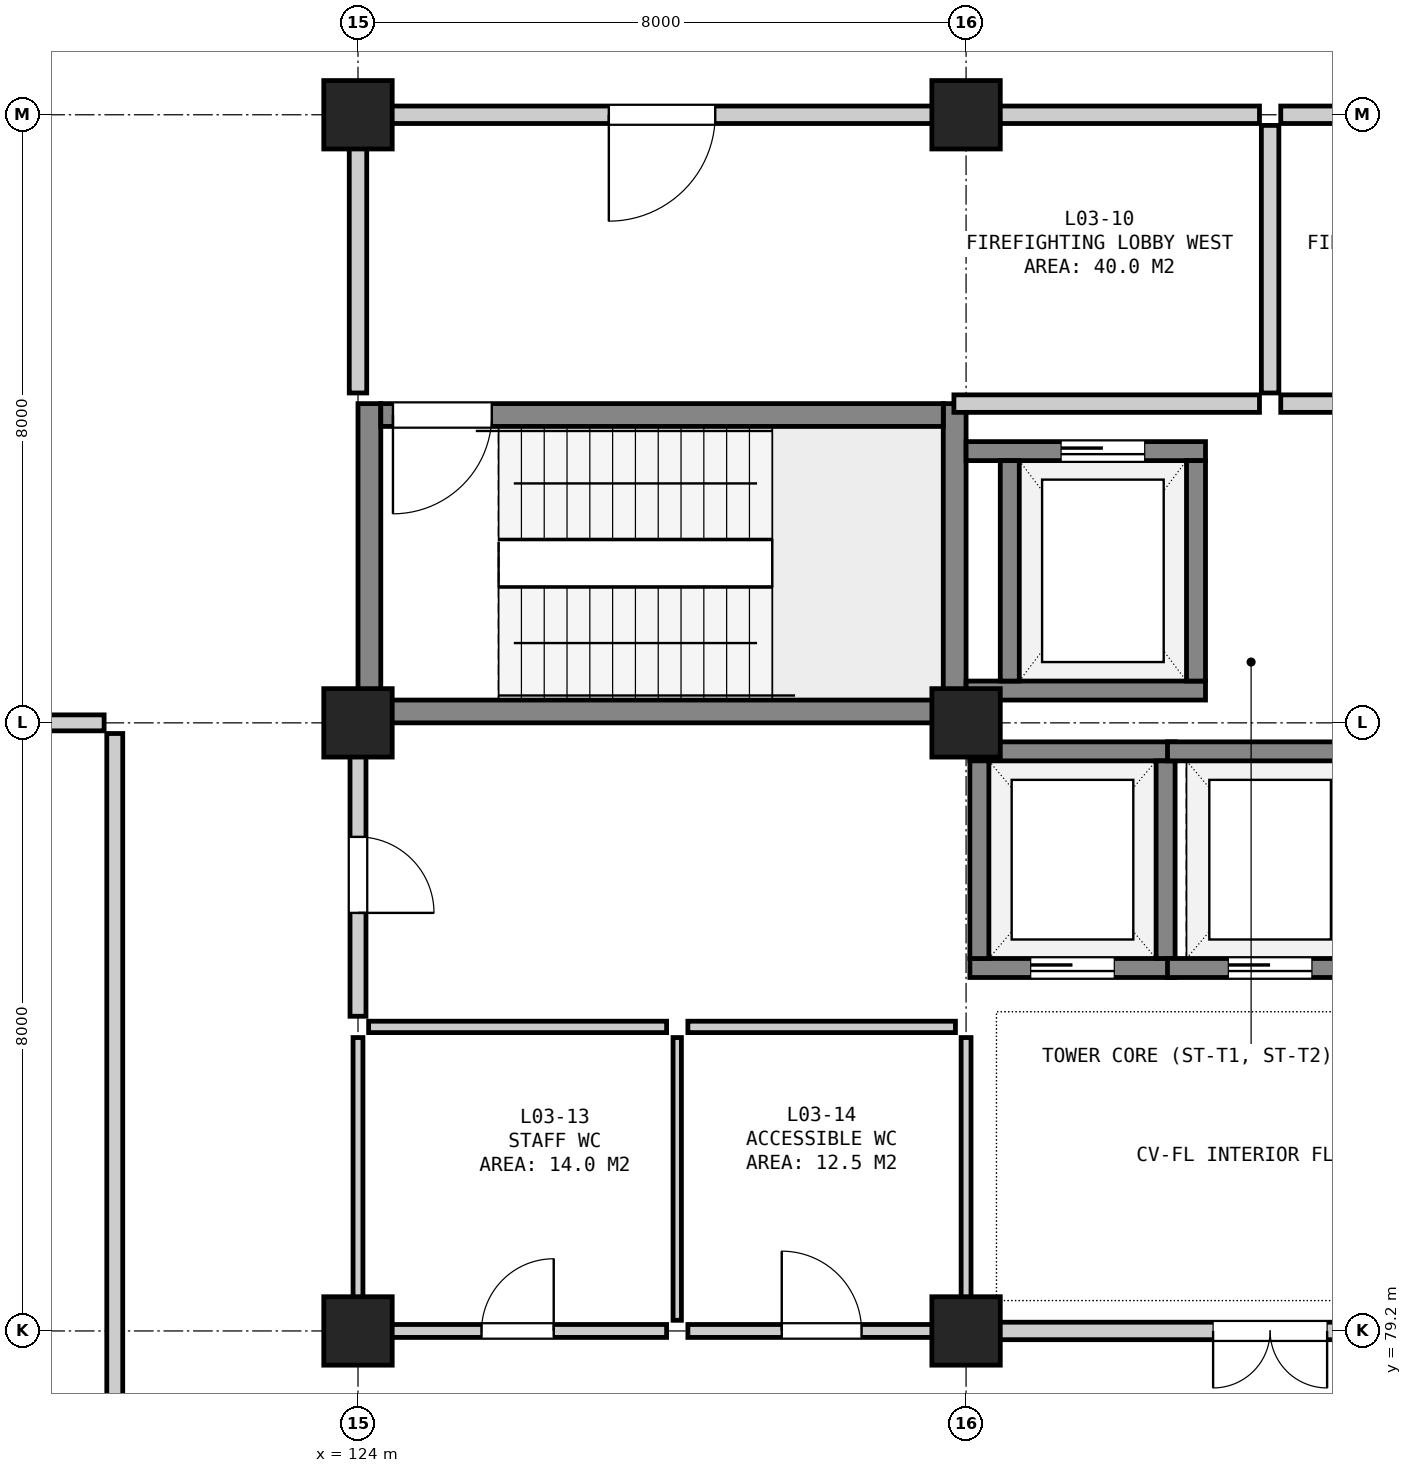
"""IFC4 building model, lengths in metres.
Left out: names, types, materials, properties, quantities, classifications, styles, units other than length and angle.
Written with IfcOpenShell. Run it as: python <this file> out.ifc"""

import sys

from ifc_helpers import new_model, si_unit, direction, frame, frame_2d, origin, origin_2d, place, context, subcontext, project, spatial, rectangle, extrude, element, fill, save


model = new_model("IFC4")
c1 = context("Model", 3, precision=1e-05, world=origin(), true_north=direction((0.0, 1.0)))
c2 = subcontext(c1, "Body", "Model", "MODEL_VIEW")
j1 = project(units=[si_unit("LENGTHUNIT", "METRE"), si_unit("PLANEANGLEUNIT", "RADIAN")], contexts=[c1])
p1 = place(None, origin())
s1 = spatial("IfcSite", under=j1, at=p1, CompositionType="ELEMENT")
p2 = place(p1, origin())
s2 = spatial("IfcBuilding", under=s1, at=p2, CompositionType="ELEMENT")
p3 = place(p2, frame((0.0, 0.0, 15.6)))
s3 = spatial("IfcBuildingStorey", under=s2, at=p3, CompositionType="ELEMENT", Elevation=15.6)
for number, where, z_axis, x_axis in (
    (1, (124.0, 79.2, 0.0), (0.0, 0.0, 1.0), (1.0, 0.0, 0.0)),
    (2, (124.0, 87.2, 0.0), (0.0, 0.0, 1.0), (1.0, 0.0, 0.0)),
    (3, (124.0, 95.2, 0.0), (0.0, 0.0, 1.0), (1.0, 0.0, 0.0)),
    (4, (132.0, 79.2, 0.0), (0.0, 0.0, 1.0), (1.0, 0.0, 0.0)),
    (5, (132.0, 87.2, 0.0), (0.0, 0.0, 1.0), (1.0, 0.0, 0.0)),
    (6, (132.0, 95.2, 0.0), (0.0, 0.0, 1.0), (1.0, 0.0, 0.0)),
):
    element("IfcColumn", number, at=place(p3, frame(where, z_axis=z_axis, x_axis=x_axis)), inside=s3, PredefinedType="COLUMN", context=c2, shape_type="SweptSolid", body=[
        extrude(rectangle(XDim=0.9, YDim=0.9, at=origin_2d()), origin(), (0.0, 0.0, 1.0), 4.2),
    ])
for number, where, z_axis, x_axis in (
    (7, (124.15, 87.2, 0.0), (0.0, 0.0, 1.0), (0.0, 1.0, 0.0)),
    (8, (131.85, 87.2, 0.0), (0.0, 0.0, 1.0), (0.0, 1.0, 0.0)),
):
    element("IfcWall", number, at=place(p3, frame(where, z_axis=z_axis, x_axis=x_axis)), inside=s3, PredefinedType="SHEAR", context=c2, shape_type="SweptSolid", body=[
        extrude(rectangle(XDim=4.2, YDim=0.3, at=frame_2d((2.1, 0.0))), origin(), (0.0, 0.0, 1.0), 3.9),
    ])
p4 = place(p3, frame((124.3, 87.35, 0.0), z_axis=(0.0, 0.0, 1.0), x_axis=(1.0, 0.0, 0.0)))
e9 = element("IfcWall", 9, at=p4, inside=s3, PredefinedType="SHEAR", context=c2, shape_type="SweptSolid", body=[
    extrude(rectangle(XDim=7.4, YDim=0.3, at=frame_2d((3.7, 0.0))), origin(), (0.0, 0.0, 1.0), 3.9),
])
p5 = place(p3, frame((124.3, 91.25, 0.0), z_axis=(0.0, 0.0, 1.0), x_axis=(1.0, 0.0, 0.0)))
e10 = element("IfcWall", 10, at=p5, inside=s3, PredefinedType="SHEAR", context=c2, shape_type="SweptSolid", body=[
    extrude(rectangle(XDim=7.4, YDim=0.3, at=frame_2d((3.7, 0.0))), origin(), (0.0, 0.0, 1.0), 3.9),
])
p6 = place(p5, frame((0.16, 0.0, 0.0)))
e11 = element("IfcOpeningElement", 11, at=p6, cuts=e10, PredefinedType="OPENING", context=c2, shape_type="SweptSolid", body=[
    extrude(rectangle(XDim=1.3, YDim=2.18, at=frame_2d((0.65, 1.09))), frame((0.0, 0.162, 0.0), z_axis=(0.0, -1.0, 0.0), x_axis=(1.0, 0.0, 0.0)), (0.0, 0.0, 1.0), 0.324),
])
p7 = place(p3, frame((132.0, 87.625, 0.0), z_axis=(0.0, 0.0, 1.0), x_axis=(1.0, 0.0, 0.0)))
e12 = element("IfcWall", 12, at=p7, inside=s3, PredefinedType="SHEAR", context=c2, shape_type="SweptSolid", body=[
    extrude(rectangle(XDim=3.15, YDim=0.25, at=frame_2d((1.575, 0.0))), origin(), (0.0, 0.0, 1.0), 3.9),
])
p8 = place(p3, frame((132.0, 90.775, 0.0), z_axis=(0.0, 0.0, 1.0), x_axis=(1.0, 0.0, 0.0)))
e13 = element("IfcWall", 13, at=p8, inside=s3, PredefinedType="SHEAR", context=c2, shape_type="SweptSolid", body=[
    extrude(rectangle(XDim=3.15, YDim=0.25, at=frame_2d((1.575, 0.0))), origin(), (0.0, 0.0, 1.0), 3.9),
])
p9 = place(p8, frame((1.25, 0.0, 0.0)))
e14 = element("IfcOpeningElement", 14, at=p9, cuts=e13, PredefinedType="OPENING", context=c2, shape_type="SweptSolid", body=[
    extrude(rectangle(XDim=1.1, YDim=2.15, at=frame_2d((0.55, 1.075))), frame((0.0, 0.137, 0.0), z_axis=(0.0, -1.0, 0.0), x_axis=(1.0, 0.0, 0.0)), (0.0, 0.0, 1.0), 0.274),
])
for number, where, z_axis, x_axis in (
    (15, (132.575, 87.75, 0.0), (0.0, 0.0, 1.0), (0.0, 1.0, 0.0)),
    (16, (135.025, 87.75, 0.0), (0.0, 0.0, 1.0), (0.0, 1.0, 0.0)),
):
    element("IfcWall", number, at=place(p3, frame(where, z_axis=z_axis, x_axis=x_axis)), inside=s3, PredefinedType="SHEAR", context=c2, shape_type="SweptSolid", body=[
        extrude(rectangle(XDim=2.9, YDim=0.25, at=frame_2d((1.45, 0.0))), origin(), (0.0, 0.0, 1.0), 3.9),
    ])
p10 = place(p3, frame((132.05, 83.975, 0.0), z_axis=(0.0, 0.0, 1.0), x_axis=(1.0, 0.0, 0.0)))
e17 = element("IfcWall", 17, at=p10, inside=s3, PredefinedType="SHEAR", context=c2, shape_type="SweptSolid", body=[
    extrude(rectangle(XDim=2.7, YDim=0.25, at=frame_2d((1.35, 0.0))), origin(), (0.0, 0.0, 1.0), 3.9),
])
p11 = place(p10, frame((0.8, 0.0, 0.0)))
e18 = element("IfcOpeningElement", 18, at=p11, cuts=e17, PredefinedType="OPENING", context=c2, shape_type="SweptSolid", body=[
    extrude(rectangle(XDim=1.1, YDim=2.15, at=frame_2d((0.55, 1.075))), frame((0.0, 0.137, 0.0), z_axis=(0.0, -1.0, 0.0), x_axis=(1.0, 0.0, 0.0)), (0.0, 0.0, 1.0), 0.274),
])
p12 = place(p3, frame((132.05, 86.825, 0.0), z_axis=(0.0, 0.0, 1.0), x_axis=(1.0, 0.0, 0.0)))
e19 = element("IfcWall", 19, at=p12, inside=s3, PredefinedType="SHEAR", context=c2, shape_type="SweptSolid", body=[
    extrude(rectangle(XDim=2.7, YDim=0.25, at=frame_2d((1.35, 0.0))), origin(), (0.0, 0.0, 1.0), 3.9),
])
for number, where, z_axis, x_axis in (
    (20, (132.175, 84.1, 0.0), (0.0, 0.0, 1.0), (0.0, 1.0, 0.0)),
    (21, (134.625, 84.1, 0.0), (0.0, 0.0, 1.0), (0.0, 1.0, 0.0)),
):
    element("IfcWall", number, at=place(p3, frame(where, z_axis=z_axis, x_axis=x_axis)), inside=s3, PredefinedType="SHEAR", context=c2, shape_type="SweptSolid", body=[
        extrude(rectangle(XDim=2.6, YDim=0.25, at=frame_2d((1.3, 0.0))), origin(), (0.0, 0.0, 1.0), 3.9),
    ])
p13 = place(p3, frame((134.65, 83.975, 0.0), z_axis=(0.0, 0.0, 1.0), x_axis=(1.0, 0.0, 0.0)))
e22 = element("IfcWall", 22, at=p13, inside=s3, PredefinedType="SHEAR", context=c2, shape_type="SweptSolid", body=[
    extrude(rectangle(XDim=2.7, YDim=0.25, at=frame_2d((1.35, 0.0))), origin(), (0.0, 0.0, 1.0), 3.9),
])
p14 = place(p13, frame((0.8, 0.0, 0.0)))
e23 = element("IfcOpeningElement", 23, at=p14, cuts=e22, PredefinedType="OPENING", context=c2, shape_type="SweptSolid", body=[
    extrude(rectangle(XDim=1.1, YDim=2.15, at=frame_2d((0.55, 1.075))), frame((0.0, 0.137, 0.0), z_axis=(0.0, -1.0, 0.0), x_axis=(1.0, 0.0, 0.0)), (0.0, 0.0, 1.0), 0.274),
])
p15 = place(p3, frame((134.65, 86.825, 0.0), z_axis=(0.0, 0.0, 1.0), x_axis=(1.0, 0.0, 0.0)))
e24 = element("IfcWall", 24, at=p15, inside=s3, PredefinedType="SHEAR", context=c2, shape_type="SweptSolid", body=[
    extrude(rectangle(XDim=2.7, YDim=0.25, at=frame_2d((1.35, 0.0))), origin(), (0.0, 0.0, 1.0), 3.9),
])
p16 = place(p3, frame((131.84, 91.4, 0.0), z_axis=(0.0, 0.0, 1.0), x_axis=(1.0, 0.0, 0.0)))
e25 = element("IfcWall", 25, at=p16, inside=s3, PredefinedType="SOLIDWALL", context=c2, shape_type="SweptSolid", body=[
    extrude(rectangle(XDim=4.02, YDim=0.23, at=frame_2d((2.01, 0.0))), origin(), (0.0, 0.0, 1.0), 3.9),
])
p17 = place(p3, frame((124.14, 95.2, 0.0), z_axis=(0.0, 0.0, 1.0), x_axis=(1.0, 0.0, 0.0)))
e26 = element("IfcWall", 26, at=p17, inside=s3, PredefinedType="SOLIDWALL", context=c2, shape_type="SweptSolid", body=[
    extrude(rectangle(XDim=11.72, YDim=0.23, at=frame_2d((5.86, 0.0))), origin(), (0.0, 0.0, 1.0), 3.195),
])
p18 = place(p17, frame((3.16, 0.0, 0.0)))
e27 = element("IfcOpeningElement", 27, at=p18, cuts=e26, PredefinedType="OPENING", context=c2, shape_type="SweptSolid", body=[
    extrude(rectangle(XDim=1.4, YDim=2.2, at=frame_2d((0.7, 1.1))), frame((0.0, 0.127, 0.0), z_axis=(0.0, -1.0, 0.0), x_axis=(1.0, 0.0, 0.0)), (0.0, 0.0, 1.0), 0.254),
])
p19 = place(p3, frame((124.0, 91.54, 0.0), z_axis=(0.0, 0.0, 1.0), x_axis=(0.0, 1.0, 0.0)))
e28 = element("IfcWall", 28, at=p19, inside=s3, PredefinedType="SOLIDWALL", context=c2, shape_type="SweptSolid", body=[
    extrude(rectangle(XDim=3.52, YDim=0.23, at=frame_2d((1.76, 0.0))), origin(), (0.0, 0.0, 1.0), 3.145),
])
p20 = place(p3, frame((136.0, 91.54, 0.0), z_axis=(0.0, 0.0, 1.0), x_axis=(0.0, 1.0, 0.0)))
e29 = element("IfcWall", 29, at=p20, inside=s3, PredefinedType="SOLIDWALL", context=c2, shape_type="SweptSolid", body=[
    extrude(rectangle(XDim=3.52, YDim=0.23, at=frame_2d((1.76, 0.0))), origin(), (0.0, 0.0, 1.0), 3.9),
])
p21 = place(p3, frame((136.14, 91.4, 0.0), z_axis=(0.0, 0.0, 1.0), x_axis=(1.0, 0.0, 0.0)))
e30 = element("IfcWall", 30, at=p21, inside=s3, PredefinedType="SOLIDWALL", context=c2, shape_type="SweptSolid", body=[
    extrude(rectangle(XDim=4.02, YDim=0.23, at=frame_2d((2.01, 0.0))), origin(), (0.0, 0.0, 1.0), 3.9),
])
p22 = place(p3, frame((136.14, 95.2, 0.0), z_axis=(0.0, 0.0, 1.0), x_axis=(1.0, 0.0, 0.0)))
e31 = element("IfcWall", 31, at=p22, inside=s3, PredefinedType="SOLIDWALL", context=c2, shape_type="SweptSolid", body=[
    extrude(rectangle(XDim=11.72, YDim=0.23, at=frame_2d((5.86, 0.0))), origin(), (0.0, 0.0, 1.0), 3.245),
])
p23 = place(p22, frame((7.16, 0.0, 0.0)))
e32 = element("IfcOpeningElement", 32, at=p23, cuts=e31, PredefinedType="OPENING", context=c2, shape_type="SweptSolid", body=[
    extrude(rectangle(XDim=1.4, YDim=2.2, at=frame_2d((0.7, 1.1))), frame((0.0, 0.127, 0.0), z_axis=(0.0, -1.0, 0.0), x_axis=(1.0, 0.0, 0.0)), (0.0, 0.0, 1.0), 0.254),
])
p24 = place(p3, frame((124.14, 79.2, 0.0), z_axis=(0.0, 0.0, 1.0), x_axis=(1.0, 0.0, 0.0)))
e33 = element("IfcWall", 33, at=p24, inside=s3, PredefinedType="PARTITIONING", context=c2, shape_type="SweptSolid", body=[
    extrude(rectangle(XDim=3.92, YDim=0.17, at=frame_2d((1.96, 0.0))), origin(), (0.0, 0.0, 1.0), 3.295),
])
p25 = place(p24, frame((1.485, 0.0, 0.0)))
e34 = element("IfcOpeningElement", 34, at=p25, cuts=e33, PredefinedType="OPENING", context=c2, shape_type="SweptSolid", body=[
    extrude(rectangle(XDim=0.95, YDim=2.15, at=frame_2d((0.475, 1.075))), frame((0.0, 0.097, 0.0), z_axis=(0.0, -1.0, 0.0), x_axis=(1.0, 0.0, 0.0)), (0.0, 0.0, 1.0), 0.194),
])
p26 = place(p3, frame((124.14, 83.2, 0.0), z_axis=(0.0, 0.0, 1.0), x_axis=(1.0, 0.0, 0.0)))
e35 = element("IfcWall", 35, at=p26, inside=s3, PredefinedType="PARTITIONING", context=c2, shape_type="SweptSolid", body=[
    extrude(rectangle(XDim=3.92, YDim=0.15, at=frame_2d((1.96, 0.0))), origin(), (0.0, 0.0, 1.0), 3.9),
])
p27 = place(p3, frame((124.0, 79.34, 0.0), z_axis=(0.0, 0.0, 1.0), x_axis=(0.0, 1.0, 0.0)))
e36 = element("IfcWall", 36, at=p27, inside=s3, PredefinedType="PARTITIONING", context=c2, shape_type="SweptSolid", body=[
    extrude(rectangle(XDim=3.72, YDim=0.13, at=frame_2d((1.86, 0.0))), origin(), (0.0, 0.0, 1.0), 3.095),
])
p28 = place(p3, frame((128.2, 79.34, 0.0), z_axis=(0.0, 0.0, 1.0), x_axis=(0.0, 1.0, 0.0)))
e37 = element("IfcWall", 37, at=p28, inside=s3, PredefinedType="PARTITIONING", context=c2, shape_type="SweptSolid", body=[
    extrude(rectangle(XDim=3.72, YDim=0.11, at=frame_2d((1.86, 0.0))), origin(), (0.0, 0.0, 1.0), 3.9),
])
p29 = place(p3, frame((128.34, 79.2, 0.0), z_axis=(0.0, 0.0, 1.0), x_axis=(1.0, 0.0, 0.0)))
e38 = element("IfcWall", 38, at=p29, inside=s3, PredefinedType="PARTITIONING", context=c2, shape_type="SweptSolid", body=[
    extrude(rectangle(XDim=3.52, YDim=0.17, at=frame_2d((1.76, 0.0))), origin(), (0.0, 0.0, 1.0), 3.295),
])
p30 = place(p29, frame((1.235, 0.0, 0.0)))
e39 = element("IfcOpeningElement", 39, at=p30, cuts=e38, PredefinedType="OPENING", context=c2, shape_type="SweptSolid", body=[
    extrude(rectangle(XDim=1.05, YDim=2.15, at=frame_2d((0.525, 1.075))), frame((0.0, 0.097, 0.0), z_axis=(0.0, -1.0, 0.0), x_axis=(1.0, 0.0, 0.0)), (0.0, 0.0, 1.0), 0.194),
])
p31 = place(p3, frame((128.34, 83.2, 0.0), z_axis=(0.0, 0.0, 1.0), x_axis=(1.0, 0.0, 0.0)))
e40 = element("IfcWall", 40, at=p31, inside=s3, PredefinedType="PARTITIONING", context=c2, shape_type="SweptSolid", body=[
    extrude(rectangle(XDim=3.52, YDim=0.15, at=frame_2d((1.76, 0.0))), origin(), (0.0, 0.0, 1.0), 3.9),
])
p32 = place(p3, frame((132.0, 79.34, 0.0), z_axis=(0.0, 0.0, 1.0), x_axis=(0.0, 1.0, 0.0)))
e41 = element("IfcWall", 41, at=p32, inside=s3, PredefinedType="PARTITIONING", context=c2, shape_type="SweptSolid", body=[
    extrude(rectangle(XDim=3.72, YDim=0.13, at=frame_2d((1.86, 0.0))), origin(), (0.0, 0.0, 1.0), 3.395),
])
p33 = place(p3, frame((124.0, 83.34, 0.0), z_axis=(0.0, 0.0, 1.0), x_axis=(0.0, 1.0, 0.0)))
e42 = element("IfcWall", 42, at=p33, inside=s3, PredefinedType="SOLIDWALL", context=c2, shape_type="SweptSolid", body=[
    extrude(rectangle(XDim=3.72, YDim=0.21, at=frame_2d((1.86, 0.0))), origin(), (0.0, 0.0, 1.0), 3.095),
])
p34 = place(p33, frame((1.36, 0.0, 0.0)))
e43 = element("IfcOpeningElement", 43, at=p34, cuts=e42, PredefinedType="OPENING", context=c2, shape_type="SweptSolid", body=[
    extrude(rectangle(XDim=1.0, YDim=2.15, at=frame_2d((0.5, 1.075))), frame((0.0, 0.117, 0.0), z_axis=(0.0, -1.0, 0.0), x_axis=(1.0, 0.0, 0.0)), (0.0, 0.0, 1.0), 0.234),
])
p35 = place(p3, frame((132.14, 79.2, 0.0), z_axis=(0.0, 0.0, 1.0), x_axis=(1.0, 0.0, 0.0)))
e44 = element("IfcWall", 44, at=p35, inside=s3, PredefinedType="SOLIDWALL", context=c2, shape_type="SweptSolid", body=[
    extrude(rectangle(XDim=7.72, YDim=0.23, at=frame_2d((3.86, 0.0))), origin(), (0.0, 0.0, 1.0), 3.295),
])
p36 = place(p35, frame((3.11, 0.0, 0.0)))
e45 = element("IfcOpeningElement", 45, at=p36, cuts=e44, PredefinedType="OPENING", context=c2, shape_type="SweptSolid", body=[
    extrude(rectangle(XDim=1.5, YDim=2.2, at=frame_2d((0.75, 1.1))), frame((0.0, 0.127, 0.0), z_axis=(0.0, -1.0, 0.0), x_axis=(1.0, 0.0, 0.0)), (0.0, 0.0, 1.0), 0.254),
])
p37 = place(p3, frame((102.54, 87.2, 0.0), z_axis=(0.0, 0.0, 1.0), x_axis=(1.0, 0.0, 0.0)))
e46 = element("IfcWall", 46, at=p37, inside=s3, PredefinedType="SOLIDWALL", context=c2, shape_type="SweptSolid", body=[
    extrude(rectangle(XDim=18.12, YDim=0.21, at=frame_2d((9.06, 0.0))), origin(), (0.0, 0.0, 1.0), 3.095),
])
p38 = place(p37, frame((11.16, 0.0, 0.0)))
e47 = element("IfcOpeningElement", 47, at=p38, cuts=e46, PredefinedType="OPENING", context=c2, shape_type="SweptSolid", body=[
    extrude(rectangle(XDim=1.4, YDim=2.2, at=frame_2d((0.7, 1.1))), frame((0.0, 0.117, 0.0), z_axis=(0.0, -1.0, 0.0), x_axis=(1.0, 0.0, 0.0)), (0.0, 0.0, 1.0), 0.234),
])
p39 = place(p3, frame((120.8, 76.14, 0.0), z_axis=(0.0, 0.0, 1.0), x_axis=(0.0, 1.0, 0.0)))
e48 = element("IfcWall", 48, at=p39, inside=s3, PredefinedType="SOLIDWALL", context=c2, shape_type="SweptSolid", body=[
    extrude(rectangle(XDim=10.92, YDim=0.21, at=frame_2d((5.46, 0.0))), origin(), (0.0, 0.0, 1.0), 3.9),
])
p40 = place(p6, frame((1.3, 0.0, 0.0), z_axis=(0.0, 0.0, 1.0), x_axis=(-1.0, 0.0, 0.0)))
e49 = element("IfcDoor", 49, at=p40, inside=s3, OperationType="SINGLE_SWING_RIGHT", PredefinedType="DOOR", context=c2, shape_type="SweptSolid", body=[
    extrude(rectangle(XDim=1.3, YDim=2.18, at=frame_2d((0.65, 1.09))), frame((0.0, 0.025, 0.0), z_axis=(0.0, -1.0, 0.0), x_axis=(1.0, 0.0, 0.0)), (0.0, 0.0, 1.0), 0.05),
])
fill(e11, e49)
p41 = place(p9, origin())
e50 = element("IfcDoor", 50, at=p41, inside=s3, OperationType="SLIDING_TO_LEFT", PredefinedType="DOOR", context=c2, shape_type="SweptSolid", body=[
    extrude(rectangle(XDim=1.1, YDim=2.15, at=frame_2d((0.55, 1.075))), frame((0.0, 0.025, 0.0), z_axis=(0.0, -1.0, 0.0), x_axis=(1.0, 0.0, 0.0)), (0.0, 0.0, 1.0), 0.05),
])
fill(e14, e50)
p42 = place(p11, origin())
e51 = element("IfcDoor", 51, at=p42, inside=s3, OperationType="SLIDING_TO_LEFT", PredefinedType="DOOR", context=c2, shape_type="SweptSolid", body=[
    extrude(rectangle(XDim=1.1, YDim=2.15, at=frame_2d((0.55, 1.075))), frame((0.0, 0.025, 0.0), z_axis=(0.0, -1.0, 0.0), x_axis=(1.0, 0.0, 0.0)), (0.0, 0.0, 1.0), 0.05),
])
fill(e18, e51)
p43 = place(p14, origin())
e52 = element("IfcDoor", 52, at=p43, inside=s3, OperationType="SLIDING_TO_LEFT", PredefinedType="DOOR", context=c2, shape_type="SweptSolid", body=[
    extrude(rectangle(XDim=1.1, YDim=2.15, at=frame_2d((0.55, 1.075))), frame((0.0, 0.025, 0.0), z_axis=(0.0, -1.0, 0.0), x_axis=(1.0, 0.0, 0.0)), (0.0, 0.0, 1.0), 0.05),
])
fill(e23, e52)
p44 = place(p18, frame((1.4, 0.0, 0.0), z_axis=(0.0, 0.0, 1.0), x_axis=(-1.0, 0.0, 0.0)))
e53 = element("IfcDoor", 53, at=p44, inside=s3, OperationType="SINGLE_SWING_RIGHT", PredefinedType="DOOR", context=c2, shape_type="SweptSolid", body=[
    extrude(rectangle(XDim=1.4, YDim=2.2, at=frame_2d((0.7, 1.1))), frame((0.0, 0.025, 0.0), z_axis=(0.0, -1.0, 0.0), x_axis=(1.0, 0.0, 0.0)), (0.0, 0.0, 1.0), 0.05),
])
fill(e27, e53)
p45 = place(p25, origin())
e54 = element("IfcDoor", 54, at=p45, inside=s3, OperationType="SINGLE_SWING_RIGHT", PredefinedType="DOOR", context=c2, shape_type="SweptSolid", body=[
    extrude(rectangle(XDim=0.95, YDim=2.15, at=frame_2d((0.475, 1.075))), frame((0.0, 0.025, 0.0), z_axis=(0.0, -1.0, 0.0), x_axis=(1.0, 0.0, 0.0)), (0.0, 0.0, 1.0), 0.05),
])
fill(e34, e54)
p46 = place(p30, origin())
e55 = element("IfcDoor", 55, at=p46, inside=s3, OperationType="SINGLE_SWING_LEFT", PredefinedType="DOOR", context=c2, shape_type="SweptSolid", body=[
    extrude(rectangle(XDim=1.05, YDim=2.15, at=frame_2d((0.525, 1.075))), frame((0.0, 0.025, 0.0), z_axis=(0.0, -1.0, 0.0), x_axis=(1.0, 0.0, 0.0)), (0.0, 0.0, 1.0), 0.05),
])
fill(e39, e55)
p47 = place(p34, frame((1.0, 0.0, 0.0), z_axis=(0.0, 0.0, 1.0), x_axis=(-1.0, 0.0, 0.0)))
e56 = element("IfcDoor", 56, at=p47, inside=s3, OperationType="SINGLE_SWING_RIGHT", PredefinedType="DOOR", context=c2, shape_type="SweptSolid", body=[
    extrude(rectangle(XDim=1.0, YDim=2.15, at=frame_2d((0.5, 1.075))), frame((0.0, 0.025, 0.0), z_axis=(0.0, -1.0, 0.0), x_axis=(1.0, 0.0, 0.0)), (0.0, 0.0, 1.0), 0.05),
])
fill(e43, e56)
p48 = place(p36, frame((1.5, 0.0, 0.0), z_axis=(0.0, 0.0, 1.0), x_axis=(-1.0, 0.0, 0.0)))
e57 = element("IfcDoor", 57, at=p48, inside=s3, OperationType="DOUBLE_DOOR_SINGLE_SWING", PredefinedType="DOOR", context=c2, shape_type="SweptSolid", body=[
    extrude(rectangle(XDim=1.5, YDim=2.2, at=frame_2d((0.75, 1.1))), frame((0.0, 0.025, 0.0), z_axis=(0.0, -1.0, 0.0), x_axis=(1.0, 0.0, 0.0)), (0.0, 0.0, 1.0), 0.05),
])
fill(e45, e57)
save(model, sys.argv[1])
